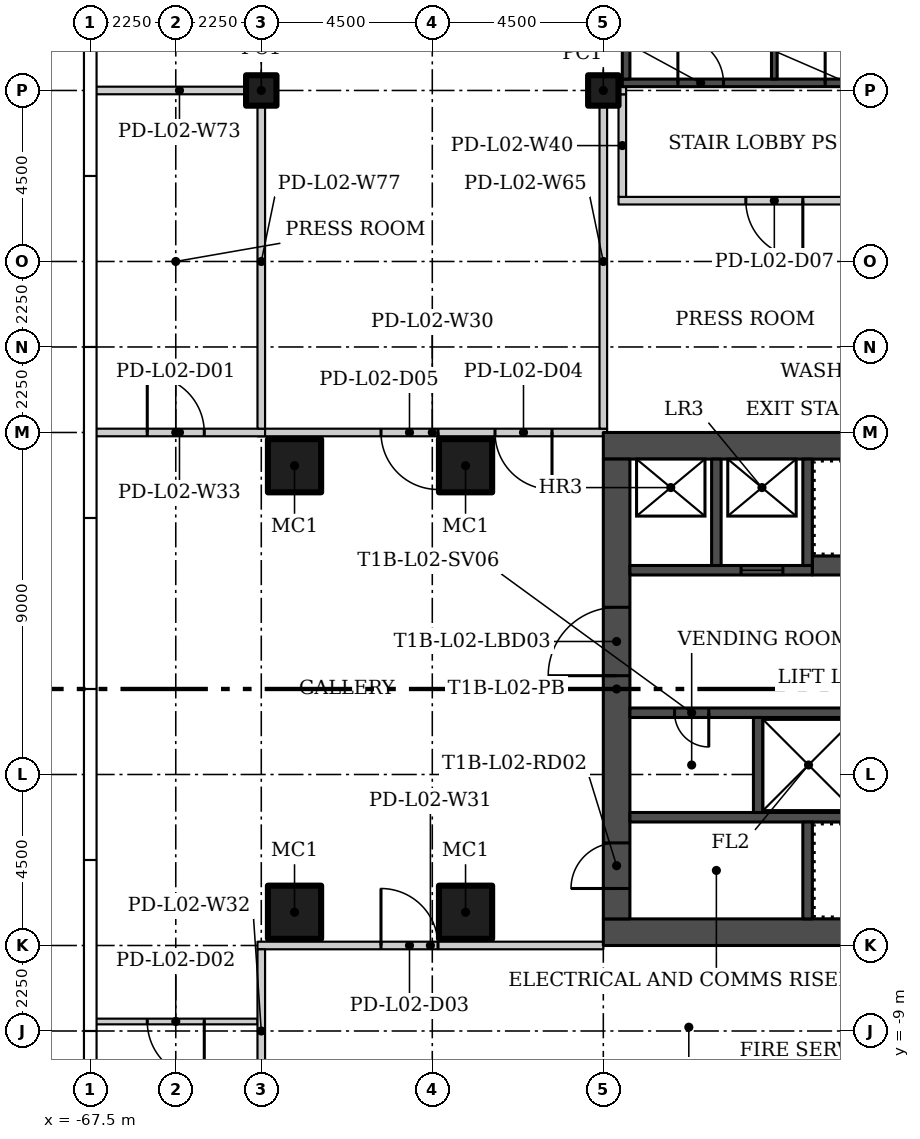
"""IFC4 building model, lengths in metres.
Left out: names, types, materials, properties, quantities, classifications, styles, units other than length and angle.
Written with IfcOpenShell. Run it as: python <this file> out.ifc"""

import sys

from ifc_helpers import new_model, si_unit, direction, frame, frame_2d, origin, origin_2d, place, context, subcontext, project, spatial, rectangle, hollow_rectangle, extrude, element, fill, save


model = new_model("IFC4")
c1 = context("Model", 3, precision=1e-05, world=origin(), true_north=direction((0.0, 1.0)))
c2 = subcontext(c1, "Body", "Model", "MODEL_VIEW")
j1 = project(units=[si_unit("LENGTHUNIT", "METRE"), si_unit("PLANEANGLEUNIT", "RADIAN")], contexts=[c1])
p1 = place(None, origin())
s1 = spatial("IfcSite", under=j1, at=p1, CompositionType="ELEMENT")
p2 = place(p1, origin())
s2 = spatial("IfcBuilding", under=s1, at=p2, CompositionType="ELEMENT")
p3 = place(p2, frame((0.0, 0.0, 12.5)))
s3 = spatial("IfcBuildingStorey", under=s2, at=p3, CompositionType="ELEMENT", Elevation=12.5)
for number, where in (
    (1, (-57.625, -5.875, 0.0)),
    (2, (-62.125, -5.875, 0.0)),
    (3, (-57.625, 5.875, 0.0)),
    (4, (-62.125, 5.875, 0.0)),
):
    element("IfcColumn", number, at=place(p3, frame(where)), inside=s3, PredefinedType="COLUMN", context=c2, shape_type="SweptSolid", body=[
        extrude(hollow_rectangle(XDim=1.4, YDim=1.4, WallThickness=0.06, at=origin_2d()), origin(), (0.0, 0.0, 1.0), 5.6),
    ])
for number, where in (
    (5, (-63.0, 15.75, 0.0)),
    (6, (-54.0, 15.75, 0.0)),
):
    element("IfcColumn", number, at=place(p3, frame(where)), inside=s3, PredefinedType="COLUMN", context=c2, shape_type="SweptSolid", body=[
        extrude(hollow_rectangle(XDim=0.8, YDim=0.8, WallThickness=0.03, at=origin_2d()), origin(), (0.0, 0.0, 1.0), 5.6),
    ])
p4 = place(p3, frame((-63.1, -8.75, 0.0), z_axis=(0.0, 0.0, 1.0), x_axis=(-1.0, 0.0, 0.0)))
e7 = element("IfcWall", 7, at=p4, inside=s3, PredefinedType="PARTITIONING", context=c2, shape_type="SweptSolid", body=[
    extrude(rectangle(XDim=4.305, YDim=0.15, at=frame_2d((2.152, 0.0))), origin(), (0.0, 0.0, 1.0), 5.6),
])
p5 = place(p4, frame((1.4, 0.0, 0.0)))
e8 = element("IfcOpeningElement", 8, at=p5, cuts=e7, PredefinedType="OPENING", context=c2, shape_type="SweptSolid", body=[
    extrude(rectangle(XDim=1.5, YDim=2.1, at=frame_2d((0.75, 1.05))), frame((0.0, 0.085, 0.0), z_axis=(0.0, -1.0, 0.0), x_axis=(1.0, 0.0, 0.0)), (0.0, 0.0, 1.0), 0.17),
])
p6 = place(p3, frame((-53.9, 6.75, 0.0), z_axis=(0.0, 0.0, 1.0), x_axis=(-1.0, 0.0, 0.0)))
e9 = element("IfcWall", 9, at=p6, inside=s3, PredefinedType="PARTITIONING", context=c2, shape_type="SweptSolid", body=[
    extrude(rectangle(XDim=9.2, YDim=0.2, at=frame_2d((4.6, 0.0))), origin(), (0.0, 0.0, 1.0), 5.6),
])
p7 = place(p6, frame((1.45, 0.0, 0.0)))
e10 = element("IfcOpeningElement", 10, at=p7, cuts=e9, PredefinedType="OPENING", context=c2, shape_type="SweptSolid", body=[
    extrude(rectangle(XDim=1.5, YDim=2.1, at=frame_2d((0.75, 1.05))), frame((0.0, 0.11, 0.0), z_axis=(0.0, -1.0, 0.0), x_axis=(1.0, 0.0, 0.0)), (0.0, 0.0, 1.0), 0.22),
])
p8 = place(p6, frame((4.45, 0.0, 0.0)))
e11 = element("IfcOpeningElement", 11, at=p8, cuts=e9, PredefinedType="OPENING", context=c2, shape_type="SweptSolid", body=[
    extrude(rectangle(XDim=1.5, YDim=2.1, at=frame_2d((0.75, 1.05))), frame((0.0, 0.11, 0.0), z_axis=(0.0, -1.0, 0.0), x_axis=(1.0, 0.0, 0.0)), (0.0, 0.0, 1.0), 0.22),
])
p9 = place(p3, frame((-63.1, -6.75, 0.0)))
e12 = element("IfcWall", 12, at=p9, inside=s3, PredefinedType="PARTITIONING", context=c2, shape_type="SweptSolid", body=[
    extrude(rectangle(XDim=9.1, YDim=0.2, at=frame_2d((4.55, 0.0))), origin(), (0.0, 0.0, 1.0), 5.6),
])
p10 = place(p9, frame((3.25, 0.0, 0.0)))
e13 = element("IfcOpeningElement", 13, at=p10, cuts=e12, PredefinedType="OPENING", context=c2, shape_type="SweptSolid", body=[
    extrude(rectangle(XDim=1.5, YDim=2.1, at=frame_2d((0.75, 1.05))), frame((0.0, 0.11, 0.0), z_axis=(0.0, -1.0, 0.0), x_axis=(1.0, 0.0, 0.0)), (0.0, 0.0, 1.0), 0.22),
])
p11 = place(p3, frame((-63.0, -11.15, 0.0), z_axis=(0.0, 0.0, 1.0), x_axis=(0.0, 1.0, 0.0)))
e14 = element("IfcWall", 14, at=p11, inside=s3, PredefinedType="PARTITIONING", context=c2, shape_type="SweptSolid", body=[
    extrude(rectangle(XDim=4.3, YDim=0.2, at=frame_2d((2.15, 0.0))), origin(), (0.0, 0.0, 1.0), 5.6),
])
p12 = place(p3, frame((-67.405, 6.75, 0.0)))
e15 = element("IfcWall", 15, at=p12, inside=s3, PredefinedType="PARTITIONING", context=c2, shape_type="SweptSolid", body=[
    extrude(rectangle(XDim=4.505, YDim=0.2, at=frame_2d((2.252, 0.0))), origin(), (0.0, 0.0, 1.0), 5.6),
])
p13 = place(p12, frame((1.405, 0.0, 0.0)))
e16 = element("IfcOpeningElement", 16, at=p13, cuts=e15, PredefinedType="OPENING", context=c2, shape_type="SweptSolid", body=[
    extrude(rectangle(XDim=1.5, YDim=2.1, at=frame_2d((0.75, 1.05))), frame((0.0, 0.11, 0.0), z_axis=(0.0, -1.0, 0.0), x_axis=(1.0, 0.0, 0.0)), (0.0, 0.0, 1.0), 0.22),
])
p14 = place(p3, frame((-44.9, 12.85, 0.0), z_axis=(0.0, 0.0, 1.0), x_axis=(-1.0, 0.0, 0.0)))
e17 = element("IfcWall", 17, at=p14, inside=s3, PredefinedType="PARTITIONING", context=c2, shape_type="SweptSolid", body=[
    extrude(rectangle(XDim=8.7, YDim=0.2, at=frame_2d((4.35, 0.0))), origin(), (0.0, 0.0, 1.0), 5.6),
])
p15 = place(p14, frame((3.85, 0.0, 0.0)))
e18 = element("IfcOpeningElement", 18, at=p15, cuts=e17, PredefinedType="OPENING", context=c2, shape_type="SweptSolid", body=[
    extrude(rectangle(XDim=1.5, YDim=2.1, at=frame_2d((0.75, 1.05))), frame((0.0, 0.11, 0.0), z_axis=(0.0, -1.0, 0.0), x_axis=(1.0, 0.0, 0.0)), (0.0, 0.0, 1.0), 0.22),
])
p16 = place(p3, frame((-53.5, 12.95, 0.0), z_axis=(0.0, 0.0, 1.0), x_axis=(0.0, 1.0, 0.0)))
e19 = element("IfcWall", 19, at=p16, inside=s3, PredefinedType="PARTITIONING", context=c2, shape_type="SweptSolid", body=[
    extrude(rectangle(XDim=2.7, YDim=0.2, at=frame_2d((1.35, 0.0))), origin(), (0.0, 0.0, 1.0), 5.6),
])
p17 = place(p3, frame((-54.0, 6.85, 0.0), z_axis=(0.0, 0.0, 1.0), x_axis=(0.0, 1.0, 0.0)))
e20 = element("IfcWall", 20, at=p17, inside=s3, PredefinedType="PARTITIONING", context=c2, shape_type="SweptSolid", body=[
    extrude(rectangle(XDim=8.8, YDim=0.2, at=frame_2d((4.4, 0.0))), origin(), (0.0, 0.0, 1.0), 5.6),
])
p18 = place(p3, frame((-67.405, 15.75, 0.0)))
e21 = element("IfcWall", 21, at=p18, inside=s3, PredefinedType="PARTITIONING", context=c2, shape_type="SweptSolid", body=[
    extrude(rectangle(XDim=4.505, YDim=0.2, at=frame_2d((2.252, 0.0))), origin(), (0.0, 0.0, 1.0), 5.6),
])
p19 = place(p3, frame((-54.1, 15.75, 0.0)))
e22 = element("IfcWall", 22, at=p19, inside=s3, PredefinedType="PARTITIONING", context=c2, shape_type="SweptSolid", body=[
    extrude(rectangle(XDim=0.7, YDim=0.2, at=frame_2d((0.35, 0.0))), origin(), (0.0, 0.0, 1.0), 5.6),
])
p20 = place(p3, frame((-63.0, 15.65, 0.0), z_axis=(0.0, 0.0, 1.0), x_axis=(0.0, -1.0, 0.0)))
e23 = element("IfcWall", 23, at=p20, inside=s3, PredefinedType="PARTITIONING", context=c2, shape_type="SweptSolid", body=[
    extrude(rectangle(XDim=8.8, YDim=0.2, at=frame_2d((4.4, 0.0))), origin(), (0.0, 0.0, 1.0), 5.6),
])
for number, where, z_axis, x_axis in (
    (24, (-40.5, -6.4, 0.0), (0.0, 0.0, 1.0), (-1.0, 0.0, 0.0)),
    (25, (-40.5, 6.4, 0.0), (0.0, 0.0, 1.0), (-1.0, 0.0, 0.0)),
):
    element("IfcWall", number, at=place(p3, frame(where, z_axis=z_axis, x_axis=x_axis)), inside=s3, PredefinedType="SHEAR", context=c2, shape_type="SweptSolid", body=[
        extrude(rectangle(XDim=13.5, YDim=0.7, at=frame_2d((6.75, 0.0))), origin(), (0.0, 0.0, 1.0), 5.6),
    ])
p21 = place(p3, frame((-53.65, -6.05, 0.0), z_axis=(0.0, 0.0, 1.0), x_axis=(0.0, 1.0, 0.0)))
e26 = element("IfcWall", 26, at=p21, inside=s3, PredefinedType="SHEAR", context=c2, shape_type="SweptSolid", body=[
    extrude(rectangle(XDim=12.1, YDim=0.7, at=frame_2d((6.05, 0.0))), origin(), (0.0, 0.0, 1.0), 5.6),
])
p22 = place(p21, frame((0.8, 0.0, 0.0)))
e27 = element("IfcOpeningElement", 27, at=p22, cuts=e26, PredefinedType="OPENING", context=c2, shape_type="SweptSolid", body=[
    extrude(rectangle(XDim=1.2, YDim=2.1, at=frame_2d((0.6, 1.05))), frame((0.0, 0.36, 0.0), z_axis=(0.0, -1.0, 0.0), x_axis=(1.0, 0.0, 0.0)), (0.0, 0.0, 1.0), 0.72),
])
p23 = place(p21, frame((6.4, 0.0, 0.0)))
e28 = element("IfcOpeningElement", 28, at=p23, cuts=e26, PredefinedType="OPENING", context=c2, shape_type="SweptSolid", body=[
    extrude(rectangle(XDim=1.8, YDim=2.4, at=frame_2d((0.9, 1.2))), frame((0.0, 0.36, 0.0), z_axis=(0.0, -1.0, 0.0), x_axis=(1.0, 0.0, 0.0)), (0.0, 0.0, 1.0), 0.72),
])
p24 = place(p3, frame((-41.2, -3.375, 0.0), z_axis=(0.0, 0.0, 1.0), x_axis=(-1.0, 0.0, 0.0)))
e29 = element("IfcWall", 29, at=p24, inside=s3, PredefinedType="SHEAR", context=c2, shape_type="SweptSolid", body=[
    extrude(rectangle(XDim=12.1, YDim=0.25, at=frame_2d((6.05, 0.0))), origin(), (0.0, 0.0, 1.0), 5.6),
])
p25 = place(p24, frame((0.05, 0.0, 0.0)))
e30 = element("IfcOpeningElement", 30, at=p25, cuts=e29, PredefinedType="OPENING", context=c2, shape_type="SweptSolid", body=[
    extrude(rectangle(XDim=1.1, YDim=2.1, at=frame_2d((0.55, 1.05))), frame((0.0, 0.135, 0.0), z_axis=(0.0, -1.0, 0.0), x_axis=(1.0, 0.0, 0.0)), (0.0, 0.0, 1.0), 0.27),
])
p26 = place(p3, frame((-48.625, -6.05, 0.0), z_axis=(0.0, 0.0, 1.0), x_axis=(0.0, 1.0, 0.0)))
e31 = element("IfcWall", 31, at=p26, inside=s3, PredefinedType="SHEAR", context=c2, shape_type="SweptSolid", body=[
    extrude(rectangle(XDim=2.55, YDim=0.25, at=frame_2d((1.275, 0.0))), origin(), (0.0, 0.0, 1.0), 5.6),
])
p27 = place(p3, frame((-41.2, -0.625, 0.0), z_axis=(0.0, 0.0, 1.0), x_axis=(-1.0, 0.0, 0.0)))
e32 = element("IfcWall", 32, at=p27, inside=s3, PredefinedType="SHEAR", context=c2, shape_type="SweptSolid", body=[
    extrude(rectangle(XDim=12.1, YDim=0.25, at=frame_2d((6.05, 0.0))), origin(), (0.0, 0.0, 1.0), 5.6),
])
p28 = place(p27, frame((2.25, 0.0, 0.0)))
e33 = element("IfcOpeningElement", 33, at=p28, cuts=e32, PredefinedType="OPENING", context=c2, shape_type="SweptSolid", body=[
    extrude(rectangle(XDim=1.2, YDim=2.1, at=frame_2d((0.6, 1.05))), frame((0.0, 0.135, 0.0), z_axis=(0.0, -1.0, 0.0), x_axis=(1.0, 0.0, 0.0)), (0.0, 0.0, 1.0), 0.27),
])
p29 = place(p27, frame((10.025, 0.0, 0.0)))
e34 = element("IfcOpeningElement", 34, at=p29, cuts=e32, PredefinedType="OPENING", context=c2, shape_type="SweptSolid", body=[
    extrude(rectangle(XDim=0.9, YDim=2.1, at=frame_2d((0.45, 1.05))), frame((0.0, 0.135, 0.0), z_axis=(0.0, -1.0, 0.0), x_axis=(1.0, 0.0, 0.0)), (0.0, 0.0, 1.0), 0.27),
])
p30 = place(p3, frame((-49.925, -3.25, 0.0), z_axis=(0.0, 0.0, 1.0), x_axis=(0.0, 1.0, 0.0)))
e35 = element("IfcWall", 35, at=p30, inside=s3, PredefinedType="SHEAR", context=c2, shape_type="SweptSolid", body=[
    extrude(rectangle(XDim=2.5, YDim=0.25, at=frame_2d((1.25, 0.0))), origin(), (0.0, 0.0, 1.0), 5.6),
])
p31 = place(p3, frame((-48.5, 3.25, 0.0)))
e36 = element("IfcWall", 36, at=p31, inside=s3, PredefinedType="SHEAR", context=c2, shape_type="SweptSolid", body=[
    extrude(rectangle(XDim=7.3, YDim=0.5, at=frame_2d((3.65, 0.0))), origin(), (0.0, 0.0, 1.0), 5.6),
])
p32 = place(p31, frame((6.15, 0.0, 0.0)))
e37 = element("IfcOpeningElement", 37, at=p32, cuts=e36, PredefinedType="OPENING", context=c2, shape_type="SweptSolid", body=[
    extrude(rectangle(XDim=1.1, YDim=2.1, at=frame_2d((0.55, 1.05))), frame((0.0, 0.26, 0.0), z_axis=(0.0, -1.0, 0.0), x_axis=(1.0, 0.0, 0.0)), (0.0, 0.0, 1.0), 0.52),
])
p33 = place(p3, frame((-48.5, 3.125, 0.0), z_axis=(0.0, 0.0, 1.0), x_axis=(-1.0, 0.0, 0.0)))
e38 = element("IfcWall", 38, at=p33, inside=s3, PredefinedType="SHEAR", context=c2, shape_type="SweptSolid", body=[
    extrude(rectangle(XDim=4.8, YDim=0.25, at=frame_2d((2.4, 0.0))), origin(), (0.0, 0.0, 1.0), 5.6),
])
p34 = place(p33, frame((0.775, 0.0, 0.0)))
e39 = element("IfcOpeningElement", 39, at=p34, cuts=e38, PredefinedType="OPENING", context=c2, shape_type="SweptSolid", body=[
    extrude(rectangle(XDim=1.1, YDim=2.1, at=frame_2d((0.55, 1.05))), frame((0.0, 0.135, 0.0), z_axis=(0.0, -1.0, 0.0), x_axis=(1.0, 0.0, 0.0)), (0.0, 0.0, 1.0), 0.27),
])
for number, where, z_axis, x_axis in (
    (40, (-48.625, 3.25, 0.0), (0.0, 0.0, 1.0), (0.0, 1.0, 0.0)),
    (41, (-51.025, 3.25, 0.0), (0.0, 0.0, 1.0), (0.0, 1.0, 0.0)),
):
    element("IfcWall", number, at=place(p3, frame(where, z_axis=z_axis, x_axis=x_axis)), inside=s3, PredefinedType="SHEAR", context=c2, shape_type="SweptSolid", body=[
        extrude(rectangle(XDim=2.8, YDim=0.25, at=frame_2d((1.4, 0.0))), origin(), (0.0, 0.0, 1.0), 5.6),
    ])
p35 = place(p3, frame((-53.5, 15.95, 0.0)))
e42 = element("IfcWall", 42, at=p35, inside=s3, PredefinedType="SHEAR", context=c2, shape_type="SweptSolid", body=[
    extrude(rectangle(XDim=8.0, YDim=0.2, at=frame_2d((4.0, 0.0))), origin(), (0.0, 0.0, 1.0), 5.6),
])
p36 = place(p35, frame((1.462, 0.0, 0.0)))
e43 = element("IfcOpeningElement", 43, at=p36, cuts=e42, PredefinedType="OPENING", context=c2, shape_type="SweptSolid", body=[
    extrude(rectangle(XDim=1.2, YDim=2.4, at=frame_2d((0.6, 1.2))), frame((0.0, 0.11, 0.0), z_axis=(0.0, -1.0, 0.0), x_axis=(1.0, 0.0, 0.0)), (0.0, 0.0, 1.0), 0.22),
])
p37 = place(p35, frame((5.337, 0.0, 0.0)))
e44 = element("IfcOpeningElement", 44, at=p37, cuts=e42, PredefinedType="OPENING", context=c2, shape_type="SweptSolid", body=[
    extrude(rectangle(XDim=1.2, YDim=2.4, at=frame_2d((0.6, 1.2))), frame((0.0, 0.11, 0.0), z_axis=(0.0, -1.0, 0.0), x_axis=(1.0, 0.0, 0.0)), (0.0, 0.0, 1.0), 0.22),
])
p38 = place(p3, frame((-53.4, 16.05, 0.0), z_axis=(0.0, 0.0, 1.0), x_axis=(0.0, 1.0, 0.0)))
e45 = element("IfcWall", 45, at=p38, inside=s3, PredefinedType="SHEAR", context=c2, shape_type="SweptSolid", body=[
    extrude(rectangle(XDim=8.4, YDim=0.2, at=frame_2d((4.2, 0.0))), origin(), (0.0, 0.0, 1.0), 5.6),
])
p39 = place(p3, frame((-49.5, 16.05, 0.0), z_axis=(0.0, 0.0, 1.0), x_axis=(0.0, 1.0, 0.0)))
e46 = element("IfcWall", 46, at=p39, inside=s3, PredefinedType="SHEAR", context=c2, shape_type="SweptSolid", body=[
    extrude(rectangle(XDim=8.4, YDim=0.15, at=frame_2d((4.2, 0.0))), origin(), (0.0, 0.0, 1.0), 5.6),
])
p40 = place(p13, origin())
e47 = element("IfcDoor", 47, at=p40, inside=s3, OperationType="DOUBLE_DOOR_SINGLE_SWING", PredefinedType="DOOR", context=c2, shape_type="SweptSolid", body=[
    extrude(rectangle(XDim=1.5, YDim=2.1, at=frame_2d((0.75, 1.05))), frame((0.0, 0.025, 0.0), z_axis=(0.0, -1.0, 0.0), x_axis=(1.0, 0.0, 0.0)), (0.0, 0.0, 1.0), 0.05),
])
fill(e16, e47)
p41 = place(p5, origin())
e48 = element("IfcDoor", 48, at=p41, inside=s3, OperationType="DOUBLE_DOOR_SINGLE_SWING", PredefinedType="DOOR", context=c2, shape_type="SweptSolid", body=[
    extrude(rectangle(XDim=1.5, YDim=2.1, at=frame_2d((0.75, 1.05))), frame((0.0, 0.025, 0.0), z_axis=(0.0, -1.0, 0.0), x_axis=(1.0, 0.0, 0.0)), (0.0, 0.0, 1.0), 0.05),
])
fill(e8, e48)
p42 = place(p10, origin())
e49 = element("IfcDoor", 49, at=p42, inside=s3, OperationType="DOUBLE_DOOR_SINGLE_SWING", PredefinedType="DOOR", context=c2, shape_type="SweptSolid", body=[
    extrude(rectangle(XDim=1.5, YDim=2.1, at=frame_2d((0.75, 1.05))), frame((0.0, 0.025, 0.0), z_axis=(0.0, -1.0, 0.0), x_axis=(1.0, 0.0, 0.0)), (0.0, 0.0, 1.0), 0.05),
])
fill(e13, e49)
p43 = place(p7, origin())
e50 = element("IfcDoor", 50, at=p43, inside=s3, OperationType="DOUBLE_DOOR_SINGLE_SWING", PredefinedType="DOOR", context=c2, shape_type="SweptSolid", body=[
    extrude(rectangle(XDim=1.5, YDim=2.1, at=frame_2d((0.75, 1.05))), frame((0.0, 0.025, 0.0), z_axis=(0.0, -1.0, 0.0), x_axis=(1.0, 0.0, 0.0)), (0.0, 0.0, 1.0), 0.05),
])
fill(e10, e50)
p44 = place(p8, origin())
e51 = element("IfcDoor", 51, at=p44, inside=s3, OperationType="DOUBLE_DOOR_SINGLE_SWING", PredefinedType="DOOR", context=c2, shape_type="SweptSolid", body=[
    extrude(rectangle(XDim=1.5, YDim=2.1, at=frame_2d((0.75, 1.05))), frame((0.0, 0.025, 0.0), z_axis=(0.0, -1.0, 0.0), x_axis=(1.0, 0.0, 0.0)), (0.0, 0.0, 1.0), 0.05),
])
fill(e11, e51)
p45 = place(p15, origin())
e52 = element("IfcDoor", 52, at=p45, inside=s3, OperationType="DOUBLE_DOOR_SINGLE_SWING", PredefinedType="DOOR", context=c2, shape_type="SweptSolid", body=[
    extrude(rectangle(XDim=1.5, YDim=2.1, at=frame_2d((0.75, 1.05))), frame((0.0, 0.025, 0.0), z_axis=(0.0, -1.0, 0.0), x_axis=(1.0, 0.0, 0.0)), (0.0, 0.0, 1.0), 0.05),
])
fill(e18, e52)
p46 = place(p22, origin())
e53 = element("IfcDoor", 53, at=p46, inside=s3, OperationType="SINGLE_SWING_LEFT", PredefinedType="DOOR", context=c2, shape_type="SweptSolid", body=[
    extrude(rectangle(XDim=1.2, YDim=2.1, at=frame_2d((0.6, 1.05))), frame((0.0, 0.025, 0.0), z_axis=(0.0, -1.0, 0.0), x_axis=(1.0, 0.0, 0.0)), (0.0, 0.0, 1.0), 0.05),
])
fill(e27, e53)
p47 = place(p23, origin())
e54 = element("IfcDoor", 54, at=p47, inside=s3, OperationType="DOUBLE_DOOR_SINGLE_SWING", PredefinedType="DOOR", context=c2, shape_type="SweptSolid", body=[
    extrude(rectangle(XDim=1.8, YDim=2.4, at=frame_2d((0.9, 1.2))), frame((0.0, 0.025, 0.0), z_axis=(0.0, -1.0, 0.0), x_axis=(1.0, 0.0, 0.0)), (0.0, 0.0, 1.0), 0.05),
])
fill(e28, e54)
p48 = place(p29, origin())
e55 = element("IfcDoor", 55, at=p48, inside=s3, OperationType="SINGLE_SWING_RIGHT", PredefinedType="DOOR", context=c2, shape_type="SweptSolid", body=[
    extrude(rectangle(XDim=0.9, YDim=2.1, at=frame_2d((0.45, 1.05))), frame((0.0, 0.025, 0.0), z_axis=(0.0, -1.0, 0.0), x_axis=(1.0, 0.0, 0.0)), (0.0, 0.0, 1.0), 0.05),
])
fill(e34, e55)
p49 = place(p34, origin())
e56 = element("IfcDoor", 56, at=p49, inside=s3, OperationType="SLIDING_TO_LEFT", PredefinedType="DOOR", context=c2, shape_type="SweptSolid", body=[
    extrude(rectangle(XDim=1.1, YDim=2.1, at=frame_2d((0.55, 1.05))), frame((0.0, 0.025, 0.0), z_axis=(0.0, -1.0, 0.0), x_axis=(1.0, 0.0, 0.0)), (0.0, 0.0, 1.0), 0.05),
])
fill(e39, e56)
p50 = place(p36, origin())
e57 = element("IfcDoor", 57, at=p50, inside=s3, OperationType="SINGLE_SWING_LEFT", PredefinedType="DOOR", context=c2, shape_type="SweptSolid", body=[
    extrude(rectangle(XDim=1.2, YDim=2.4, at=frame_2d((0.6, 1.2))), frame((0.0, 0.025, 0.0), z_axis=(0.0, -1.0, 0.0), x_axis=(1.0, 0.0, 0.0)), (0.0, 0.0, 1.0), 0.05),
])
fill(e43, e57)
p51 = place(p37, origin())
e58 = element("IfcDoor", 58, at=p51, inside=s3, OperationType="SINGLE_SWING_RIGHT", PredefinedType="DOOR", context=c2, shape_type="SweptSolid", body=[
    extrude(rectangle(XDim=1.2, YDim=2.4, at=frame_2d((0.6, 1.2))), frame((0.0, 0.025, 0.0), z_axis=(0.0, -1.0, 0.0), x_axis=(1.0, 0.0, 0.0)), (0.0, 0.0, 1.0), 0.05),
])
fill(e44, e58)
save(model, sys.argv[1])
